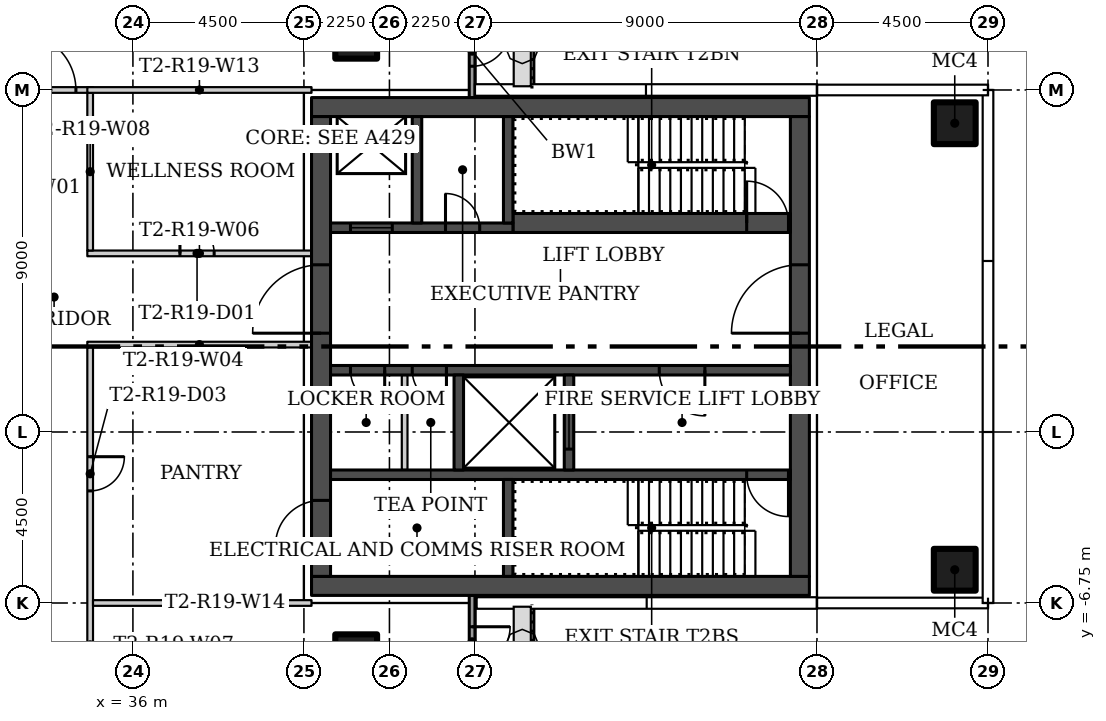
"""IFC4 building model, lengths in metres.
Left out: names, types, materials, properties, quantities, classifications, styles, units other than length and angle.
Written with IfcOpenShell. Run it as: python <this file> out.ifc"""

import sys

from ifc_helpers import new_model, si_unit, direction, frame, frame_2d, origin, origin_2d, place, context, subcontext, project, spatial, rectangle, hollow_rectangle, extrude, element, fill, save


model = new_model("IFC4")
c1 = context("Model", 3, precision=1e-05, world=origin(), true_north=direction((0.0, 1.0)))
c2 = subcontext(c1, "Body", "Model", "MODEL_VIEW")
j1 = project(units=[si_unit("LENGTHUNIT", "METRE"), si_unit("PLANEANGLEUNIT", "RADIAN")], contexts=[c1])
p1 = place(None, origin())
s1 = spatial("IfcSite", under=j1, at=p1, CompositionType="ELEMENT")
p2 = place(p1, origin())
s2 = spatial("IfcBuilding", under=s1, at=p2, CompositionType="ELEMENT")
p3 = place(p2, frame((0.0, 0.0, 170.1)))
s3 = spatial("IfcBuildingStorey", under=s2, at=p3, CompositionType="ELEMENT", Elevation=170.1)
for number, where in (
    (1, (41.875, 8.125, 0.0)),
    (2, (41.875, -8.125, 0.0)),
    (3, (57.625, -5.875, 0.0)),
    (4, (57.625, 5.875, 0.0)),
):
    element("IfcColumn", number, at=place(p3, frame(where)), inside=s3, PredefinedType="COLUMN", context=c2, shape_type="SweptSolid", body=[
        extrude(hollow_rectangle(XDim=1.1, YDim=1.1, WallThickness=0.04, at=origin_2d()), origin(), (0.0, 0.0, 1.0), 3.55),
    ])
p4 = place(p3, frame((40.7, 0.05, 0.0), z_axis=(0.0, 0.0, 1.0), x_axis=(-1.0, 0.0, 0.0)))
e5 = element("IfcWall", 5, at=p4, inside=s3, PredefinedType="PARTITIONING", context=c2, shape_type="SweptSolid", body=[
    extrude(rectangle(XDim=5.9, YDim=0.15, at=frame_2d((2.95, 0.0))), origin(), (0.0, 0.0, 1.0), 3.55),
])
p5 = place(p3, frame((34.8, 2.45, 0.0)))
e6 = element("IfcWall", 6, at=p5, inside=s3, PredefinedType="PARTITIONING", context=c2, shape_type="SweptSolid", body=[
    extrude(rectangle(XDim=5.9, YDim=0.15, at=frame_2d((2.95, 0.0))), origin(), (0.0, 0.0, 1.0), 3.55),
])
p6 = place(p5, frame((2.438, 0.0, 0.0)))
e7 = element("IfcOpeningElement", 7, at=p6, cuts=e6, PredefinedType="OPENING", context=c2, shape_type="SweptSolid", body=[
    extrude(rectangle(XDim=0.9, YDim=2.1, at=frame_2d((0.45, 1.05))), frame((0.0, 0.085, 0.0), z_axis=(0.0, -1.0, 0.0), x_axis=(1.0, 0.0, 0.0)), (0.0, 0.0, 1.0), 0.17),
])
p7 = place(p3, frame((34.875, -0.025, 0.0), z_axis=(0.0, 0.0, 1.0), x_axis=(0.0, -1.0, 0.0)))
e8 = element("IfcWall", 8, at=p7, inside=s3, PredefinedType="PARTITIONING", context=c2, shape_type="SweptSolid", body=[
    extrude(rectangle(XDim=15.65, YDim=0.15, at=frame_2d((7.825, 0.0))), origin(), (0.0, 0.0, 1.0), 3.55),
])
p8 = place(p7, frame((10.725, 0.0, 0.0)))
e9 = element("IfcOpeningElement", 9, at=p8, cuts=e8, PredefinedType="OPENING", context=c2, shape_type="SweptSolid", body=[
    extrude(rectangle(XDim=1.0, YDim=2.4, at=frame_2d((0.5, 1.2))), frame((0.0, 0.085, 0.0), z_axis=(0.0, -1.0, 0.0), x_axis=(1.0, 0.0, 0.0)), (0.0, 0.0, 1.0), 0.17),
])
p9 = place(p7, frame((2.875, 0.0, 0.0)))
e10 = element("IfcOpeningElement", 10, at=p9, cuts=e8, PredefinedType="OPENING", context=c2, shape_type="SweptSolid", body=[
    extrude(rectangle(XDim=0.9, YDim=2.1, at=frame_2d((0.45, 1.05))), frame((0.0, 0.085, 0.0), z_axis=(0.0, -1.0, 0.0), x_axis=(1.0, 0.0, 0.0)), (0.0, 0.0, 1.0), 0.17),
])
p10 = place(p3, frame((34.875, 6.675, 0.0), z_axis=(0.0, 0.0, 1.0), x_axis=(0.0, -1.0, 0.0)))
e11 = element("IfcWall", 11, at=p10, inside=s3, PredefinedType="PARTITIONING", context=c2, shape_type="SweptSolid", body=[
    extrude(rectangle(XDim=4.15, YDim=0.15, at=frame_2d((2.075, 0.0))), origin(), (0.0, 0.0, 1.0), 3.55),
])
p11 = place(p3, frame((32.575, 6.75, 0.0)))
e12 = element("IfcWall", 12, at=p11, inside=s3, PredefinedType="PARTITIONING", context=c2, shape_type="SweptSolid", body=[
    extrude(rectangle(XDim=2.375, YDim=0.15, at=frame_2d((1.188, 0.0))), origin(), (0.0, 0.0, 1.0), 3.55),
])
p12 = place(p11, frame((0.425, 0.0, 0.0)))
e13 = element("IfcOpeningElement", 13, at=p12, cuts=e12, PredefinedType="OPENING", context=c2, shape_type="SweptSolid", body=[
    extrude(rectangle(XDim=1.5, YDim=2.1, at=frame_2d((0.75, 1.05))), frame((0.0, 0.085, 0.0), z_axis=(0.0, -1.0, 0.0), x_axis=(1.0, 0.0, 0.0)), (0.0, 0.0, 1.0), 0.17),
])
p13 = place(p3, frame((40.7, 6.75, 0.0), z_axis=(0.0, 0.0, 1.0), x_axis=(-1.0, 0.0, 0.0)))
e14 = element("IfcWall", 14, at=p13, inside=s3, PredefinedType="PARTITIONING", context=c2, shape_type="SweptSolid", body=[
    extrude(rectangle(XDim=5.9, YDim=0.15, at=frame_2d((2.95, 0.0))), origin(), (0.0, 0.0, 1.0), 3.55),
])
p14 = place(p3, frame((34.95, -6.75, 0.0)))
e15 = element("IfcWall", 15, at=p14, inside=s3, PredefinedType="PARTITIONING", context=c2, shape_type="SweptSolid", body=[
    extrude(rectangle(XDim=5.75, YDim=0.15, at=frame_2d((2.875, 0.0))), origin(), (0.0, 0.0, 1.0), 3.55),
])
p15 = place(p3, frame((44.925, 9.0, 0.0), z_axis=(0.0, 0.0, 1.0), x_axis=(0.0, -1.0, 0.0)))
e16 = element("IfcWall", 16, at=p15, inside=s3, PredefinedType="SOLIDWALL", context=c2, shape_type="SweptSolid", body=[
    extrude(rectangle(XDim=2.457, YDim=0.15, at=frame_2d((1.229, 0.0))), origin(), (0.0, 0.0, 1.0), 3.45),
])
p16 = place(p15, frame((0.625, 0.0, 0.0)))
e17 = element("IfcOpeningElement", 17, at=p16, cuts=e16, PredefinedType="OPENING", context=c2, shape_type="SweptSolid", body=[
    extrude(rectangle(XDim=1.0, YDim=2.4, at=frame_2d((0.5, 1.2))), frame((0.0, 0.085, 0.0), z_axis=(0.0, -1.0, 0.0), x_axis=(1.0, 0.0, 0.0)), (0.0, 0.0, 1.0), 0.17),
])
p17 = place(p3, frame((44.925, -6.543, 0.0), z_axis=(0.0, 0.0, 1.0), x_axis=(0.0, -1.0, 0.0)))
e18 = element("IfcWall", 18, at=p17, inside=s3, PredefinedType="SOLIDWALL", context=c2, shape_type="SweptSolid", body=[
    extrude(rectangle(XDim=2.457, YDim=0.15, at=frame_2d((1.229, 0.0))), origin(), (0.0, 0.0, 1.0), 3.45),
])
p18 = place(p17, frame((0.832, 0.0, 0.0)))
e19 = element("IfcOpeningElement", 19, at=p18, cuts=e18, PredefinedType="OPENING", context=c2, shape_type="SweptSolid", body=[
    extrude(rectangle(XDim=1.0, YDim=2.4, at=frame_2d((0.5, 1.2))), frame((0.0, 0.085, 0.0), z_axis=(0.0, -1.0, 0.0), x_axis=(1.0, 0.0, 0.0)), (0.0, 0.0, 1.0), 0.17),
])
for number, where, z_axis, x_axis in (
    (20, (53.8, -6.3, 0.0), (0.0, 0.0, 1.0), (-1.0, 0.0, 0.0)),
    (21, (53.8, 6.3, 0.0), (0.0, 0.0, 1.0), (-1.0, 0.0, 0.0)),
):
    element("IfcWall", number, at=place(p3, frame(where, z_axis=z_axis, x_axis=x_axis)), inside=s3, PredefinedType="SHEAR", context=c2, shape_type="SweptSolid", body=[
        extrude(rectangle(XDim=13.1, YDim=0.5, at=frame_2d((6.55, 0.0))), origin(), (0.0, 0.0, 1.0), 3.55),
    ])
p19 = place(p3, frame((53.55, -6.05, 0.0), z_axis=(0.0, 0.0, 1.0), x_axis=(0.0, 1.0, 0.0)))
e22 = element("IfcWall", 22, at=p19, inside=s3, PredefinedType="SHEAR", context=c2, shape_type="SweptSolid", body=[
    extrude(rectangle(XDim=12.1, YDim=0.5, at=frame_2d((6.05, 0.0))), origin(), (0.0, 0.0, 1.0), 3.55),
])
p20 = place(p19, frame((6.4, 0.0, 0.0)))
e23 = element("IfcOpeningElement", 23, at=p20, cuts=e22, PredefinedType="OPENING", context=c2, shape_type="SweptSolid", body=[
    extrude(rectangle(XDim=1.8, YDim=2.4, at=frame_2d((0.9, 1.2))), frame((0.0, 0.26, 0.0), z_axis=(0.0, -1.0, 0.0), x_axis=(1.0, 0.0, 0.0)), (0.0, 0.0, 1.0), 0.52),
])
p21 = place(p3, frame((40.95, -6.05, 0.0), z_axis=(0.0, 0.0, 1.0), x_axis=(0.0, 1.0, 0.0)))
e24 = element("IfcWall", 24, at=p21, inside=s3, PredefinedType="SHEAR", context=c2, shape_type="SweptSolid", body=[
    extrude(rectangle(XDim=12.1, YDim=0.5, at=frame_2d((6.05, 0.0))), origin(), (0.0, 0.0, 1.0), 3.55),
])
p22 = place(p21, frame((0.8, 0.0, 0.0)))
e25 = element("IfcOpeningElement", 25, at=p22, cuts=e24, PredefinedType="OPENING", context=c2, shape_type="SweptSolid", body=[
    extrude(rectangle(XDim=1.2, YDim=2.1, at=frame_2d((0.6, 1.05))), frame((0.0, 0.26, 0.0), z_axis=(0.0, -1.0, 0.0), x_axis=(1.0, 0.0, 0.0)), (0.0, 0.0, 1.0), 0.52),
])
p23 = place(p21, frame((6.4, 0.0, 0.0)))
e26 = element("IfcOpeningElement", 26, at=p23, cuts=e24, PredefinedType="OPENING", context=c2, shape_type="SweptSolid", body=[
    extrude(rectangle(XDim=1.8, YDim=2.4, at=frame_2d((0.9, 1.2))), frame((0.0, 0.26, 0.0), z_axis=(0.0, -1.0, 0.0), x_axis=(1.0, 0.0, 0.0)), (0.0, 0.0, 1.0), 0.52),
])
p24 = place(p3, frame((53.3, -3.375, 0.0), z_axis=(0.0, 0.0, 1.0), x_axis=(-1.0, 0.0, 0.0)))
e27 = element("IfcWall", 27, at=p24, inside=s3, PredefinedType="SHEAR", context=c2, shape_type="SweptSolid", body=[
    extrude(rectangle(XDim=12.1, YDim=0.25, at=frame_2d((6.05, 0.0))), origin(), (0.0, 0.0, 1.0), 3.55),
])
p25 = place(p24, frame((0.05, 0.0, 0.0)))
e28 = element("IfcOpeningElement", 28, at=p25, cuts=e27, PredefinedType="OPENING", context=c2, shape_type="SweptSolid", body=[
    extrude(rectangle(XDim=1.1, YDim=2.1, at=frame_2d((0.55, 1.05))), frame((0.0, 0.135, 0.0), z_axis=(0.0, -1.0, 0.0), x_axis=(1.0, 0.0, 0.0)), (0.0, 0.0, 1.0), 0.27),
])
p26 = place(p3, frame((45.875, -6.05, 0.0), z_axis=(0.0, 0.0, 1.0), x_axis=(0.0, 1.0, 0.0)))
e29 = element("IfcWall", 29, at=p26, inside=s3, PredefinedType="SHEAR", context=c2, shape_type="SweptSolid", body=[
    extrude(rectangle(XDim=2.55, YDim=0.25, at=frame_2d((1.275, 0.0))), origin(), (0.0, 0.0, 1.0), 3.55),
])
p27 = place(p3, frame((53.3, -0.625, 0.0), z_axis=(0.0, 0.0, 1.0), x_axis=(-1.0, 0.0, 0.0)))
e30 = element("IfcWall", 30, at=p27, inside=s3, PredefinedType="SHEAR", context=c2, shape_type="SweptSolid", body=[
    extrude(rectangle(XDim=12.1, YDim=0.25, at=frame_2d((6.05, 0.0))), origin(), (0.0, 0.0, 1.0), 3.55),
])
p28 = place(p27, frame((2.25, 0.0, 0.0)))
e31 = element("IfcOpeningElement", 31, at=p28, cuts=e30, PredefinedType="OPENING", context=c2, shape_type="SweptSolid", body=[
    extrude(rectangle(XDim=1.2, YDim=2.1, at=frame_2d((0.6, 1.05))), frame((0.0, 0.135, 0.0), z_axis=(0.0, -1.0, 0.0), x_axis=(1.0, 0.0, 0.0)), (0.0, 0.0, 1.0), 0.27),
])
p29 = place(p27, frame((9.05, 0.0, 0.0)))
e32 = element("IfcOpeningElement", 32, at=p29, cuts=e30, PredefinedType="OPENING", context=c2, shape_type="SweptSolid", body=[
    extrude(rectangle(XDim=0.9, YDim=2.1, at=frame_2d((0.45, 1.05))), frame((0.0, 0.135, 0.0), z_axis=(0.0, -1.0, 0.0), x_axis=(1.0, 0.0, 0.0)), (0.0, 0.0, 1.0), 0.27),
])
p30 = place(p27, frame((10.675, 0.0, 0.0)))
e33 = element("IfcOpeningElement", 33, at=p30, cuts=e30, PredefinedType="OPENING", context=c2, shape_type="SweptSolid", body=[
    extrude(rectangle(XDim=0.9, YDim=2.1, at=frame_2d((0.45, 1.05))), frame((0.0, 0.135, 0.0), z_axis=(0.0, -1.0, 0.0), x_axis=(1.0, 0.0, 0.0)), (0.0, 0.0, 1.0), 0.27),
])
p31 = place(p3, frame((47.475, -3.25, 0.0), z_axis=(0.0, 0.0, 1.0), x_axis=(0.0, 1.0, 0.0)))
e34 = element("IfcWall", 34, at=p31, inside=s3, PredefinedType="SHEAR", context=c2, shape_type="SweptSolid", body=[
    extrude(rectangle(XDim=2.5, YDim=0.25, at=frame_2d((1.25, 0.0))), origin(), (0.0, 0.0, 1.0), 3.55),
])
p32 = place(p31, frame((0.55, 0.0, 0.0)))
e35 = element("IfcOpeningElement", 35, at=p32, cuts=e34, PredefinedType="OPENING", context=c2, shape_type="SweptSolid", body=[
    extrude(rectangle(XDim=1.4, YDim=2.4, at=frame_2d((0.7, 1.2))), frame((0.0, 0.135, 0.0), z_axis=(0.0, -1.0, 0.0), x_axis=(1.0, 0.0, 0.0)), (0.0, 0.0, 1.0), 0.27),
])
p33 = place(p3, frame((44.575, -3.25, 0.0), z_axis=(0.0, 0.0, 1.0), x_axis=(0.0, 1.0, 0.0)))
e36 = element("IfcWall", 36, at=p33, inside=s3, PredefinedType="SHEAR", context=c2, shape_type="SweptSolid", body=[
    extrude(rectangle(XDim=2.5, YDim=0.25, at=frame_2d((1.25, 0.0))), origin(), (0.0, 0.0, 1.0), 3.55),
])
p34 = place(p3, frame((43.15, -3.25, 0.0), z_axis=(0.0, 0.0, 1.0), x_axis=(0.0, 1.0, 0.0)))
e37 = element("IfcWall", 37, at=p34, inside=s3, PredefinedType="PARTITIONING", context=c2, shape_type="SweptSolid", body=[
    extrude(rectangle(XDim=2.5, YDim=0.15, at=frame_2d((1.25, 0.0))), origin(), (0.0, 0.0, 1.0), 3.55),
])
p35 = place(p3, frame((46.0, 3.25, 0.0)))
e38 = element("IfcWall", 38, at=p35, inside=s3, PredefinedType="SHEAR", context=c2, shape_type="SweptSolid", body=[
    extrude(rectangle(XDim=7.3, YDim=0.5, at=frame_2d((3.65, 0.0))), origin(), (0.0, 0.0, 1.0), 3.55),
])
p36 = place(p35, frame((6.15, 0.0, 0.0)))
e39 = element("IfcOpeningElement", 39, at=p36, cuts=e38, PredefinedType="OPENING", context=c2, shape_type="SweptSolid", body=[
    extrude(rectangle(XDim=1.1, YDim=2.1, at=frame_2d((0.55, 1.05))), frame((0.0, 0.26, 0.0), z_axis=(0.0, -1.0, 0.0), x_axis=(1.0, 0.0, 0.0)), (0.0, 0.0, 1.0), 0.52),
])
p37 = place(p3, frame((41.2, 3.125, 0.0)))
e40 = element("IfcWall", 40, at=p37, inside=s3, PredefinedType="SHEAR", context=c2, shape_type="SweptSolid", body=[
    extrude(rectangle(XDim=4.8, YDim=0.25, at=frame_2d((2.4, 0.0))), origin(), (0.0, 0.0, 1.0), 3.55),
])
p38 = place(p37, frame((0.525, 0.0, 0.0)))
e41 = element("IfcOpeningElement", 41, at=p38, cuts=e40, PredefinedType="OPENING", context=c2, shape_type="SweptSolid", body=[
    extrude(rectangle(XDim=1.1, YDim=2.1, at=frame_2d((0.55, 1.05))), frame((0.0, 0.135, 0.0), z_axis=(0.0, -1.0, 0.0), x_axis=(1.0, 0.0, 0.0)), (0.0, 0.0, 1.0), 0.27),
])
p39 = place(p37, frame((3.025, 0.0, 0.0)))
e42 = element("IfcOpeningElement", 42, at=p39, cuts=e40, PredefinedType="OPENING", context=c2, shape_type="SweptSolid", body=[
    extrude(rectangle(XDim=0.9, YDim=2.1, at=frame_2d((0.45, 1.05))), frame((0.0, 0.135, 0.0), z_axis=(0.0, -1.0, 0.0), x_axis=(1.0, 0.0, 0.0)), (0.0, 0.0, 1.0), 0.27),
])
for number, where, z_axis, x_axis in (
    (43, (45.875, 3.25, 0.0), (0.0, 0.0, 1.0), (0.0, 1.0, 0.0)),
    (44, (43.475, 3.25, 0.0), (0.0, 0.0, 1.0), (0.0, 1.0, 0.0)),
):
    element("IfcWall", number, at=place(p3, frame(where, z_axis=z_axis, x_axis=x_axis)), inside=s3, PredefinedType="SHEAR", context=c2, shape_type="SweptSolid", body=[
        extrude(rectangle(XDim=2.8, YDim=0.25, at=frame_2d((1.4, 0.0))), origin(), (0.0, 0.0, 1.0), 3.55),
    ])
p40 = place(p6, origin())
e45 = element("IfcDoor", 45, at=p40, inside=s3, OperationType="SINGLE_SWING_RIGHT", PredefinedType="DOOR", context=c2, shape_type="SweptSolid", body=[
    extrude(rectangle(XDim=0.9, YDim=2.1, at=frame_2d((0.45, 1.05))), frame((0.0, 0.025, 0.0), z_axis=(0.0, -1.0, 0.0), x_axis=(1.0, 0.0, 0.0)), (0.0, 0.0, 1.0), 0.05),
])
fill(e7, e45)
p41 = place(p9, origin())
e46 = element("IfcDoor", 46, at=p41, inside=s3, OperationType="SINGLE_SWING_LEFT", PredefinedType="DOOR", context=c2, shape_type="SweptSolid", body=[
    extrude(rectangle(XDim=0.9, YDim=2.1, at=frame_2d((0.45, 1.05))), frame((0.0, 0.025, 0.0), z_axis=(0.0, -1.0, 0.0), x_axis=(1.0, 0.0, 0.0)), (0.0, 0.0, 1.0), 0.05),
])
fill(e10, e46)
p42 = place(p12, origin())
e47 = element("IfcDoor", 47, at=p42, inside=s3, OperationType="DOUBLE_DOOR_SINGLE_SWING", PredefinedType="DOOR", context=c2, shape_type="SweptSolid", body=[
    extrude(rectangle(XDim=1.5, YDim=2.1, at=frame_2d((0.75, 1.05))), frame((0.0, 0.025, 0.0), z_axis=(0.0, -1.0, 0.0), x_axis=(1.0, 0.0, 0.0)), (0.0, 0.0, 1.0), 0.05),
])
fill(e13, e47)
p43 = place(p16, origin())
e48 = element("IfcDoor", 48, at=p43, inside=s3, OperationType="SINGLE_SWING_LEFT", PredefinedType="DOOR", context=c2, shape_type="SweptSolid", body=[
    extrude(rectangle(XDim=1.0, YDim=2.4, at=frame_2d((0.5, 1.2))), frame((0.0, 0.025, 0.0), z_axis=(0.0, -1.0, 0.0), x_axis=(1.0, 0.0, 0.0)), (0.0, 0.0, 1.0), 0.05),
])
fill(e17, e48)
p44 = place(p18, origin())
e49 = element("IfcDoor", 49, at=p44, inside=s3, OperationType="SINGLE_SWING_RIGHT", PredefinedType="DOOR", context=c2, shape_type="SweptSolid", body=[
    extrude(rectangle(XDim=1.0, YDim=2.4, at=frame_2d((0.5, 1.2))), frame((0.0, 0.025, 0.0), z_axis=(0.0, -1.0, 0.0), x_axis=(1.0, 0.0, 0.0)), (0.0, 0.0, 1.0), 0.05),
])
fill(e19, e49)
p45 = place(p20, origin())
e50 = element("IfcDoor", 50, at=p45, inside=s3, OperationType="DOUBLE_DOOR_SINGLE_SWING", PredefinedType="DOOR", context=c2, shape_type="SweptSolid", body=[
    extrude(rectangle(XDim=1.8, YDim=2.4, at=frame_2d((0.9, 1.2))), frame((0.0, 0.025, 0.0), z_axis=(0.0, -1.0, 0.0), x_axis=(1.0, 0.0, 0.0)), (0.0, 0.0, 1.0), 0.05),
])
fill(e23, e50)
p46 = place(p22, origin())
e51 = element("IfcDoor", 51, at=p46, inside=s3, OperationType="SINGLE_SWING_LEFT", PredefinedType="DOOR", context=c2, shape_type="SweptSolid", body=[
    extrude(rectangle(XDim=1.2, YDim=2.1, at=frame_2d((0.6, 1.05))), frame((0.0, 0.025, 0.0), z_axis=(0.0, -1.0, 0.0), x_axis=(1.0, 0.0, 0.0)), (0.0, 0.0, 1.0), 0.05),
])
fill(e25, e51)
p47 = place(p23, origin())
e52 = element("IfcDoor", 52, at=p47, inside=s3, OperationType="DOUBLE_DOOR_SINGLE_SWING", PredefinedType="DOOR", context=c2, shape_type="SweptSolid", body=[
    extrude(rectangle(XDim=1.8, YDim=2.4, at=frame_2d((0.9, 1.2))), frame((0.0, 0.025, 0.0), z_axis=(0.0, -1.0, 0.0), x_axis=(1.0, 0.0, 0.0)), (0.0, 0.0, 1.0), 0.05),
])
fill(e26, e52)
p48 = place(p25, origin())
e53 = element("IfcDoor", 53, at=p48, inside=s3, OperationType="SINGLE_SWING_LEFT", PredefinedType="DOOR", context=c2, shape_type="SweptSolid", body=[
    extrude(rectangle(XDim=1.1, YDim=2.1, at=frame_2d((0.55, 1.05))), frame((0.0, 0.025, 0.0), z_axis=(0.0, -1.0, 0.0), x_axis=(1.0, 0.0, 0.0)), (0.0, 0.0, 1.0), 0.05),
])
fill(e28, e53)
p49 = place(p28, origin())
e54 = element("IfcDoor", 54, at=p49, inside=s3, OperationType="SINGLE_SWING_LEFT", PredefinedType="DOOR", context=c2, shape_type="SweptSolid", body=[
    extrude(rectangle(XDim=1.2, YDim=2.1, at=frame_2d((0.6, 1.05))), frame((0.0, 0.025, 0.0), z_axis=(0.0, -1.0, 0.0), x_axis=(1.0, 0.0, 0.0)), (0.0, 0.0, 1.0), 0.05),
])
fill(e31, e54)
p50 = place(p29, origin())
e55 = element("IfcDoor", 55, at=p50, inside=s3, OperationType="SINGLE_SWING_RIGHT", PredefinedType="DOOR", context=c2, shape_type="SweptSolid", body=[
    extrude(rectangle(XDim=0.9, YDim=2.1, at=frame_2d((0.45, 1.05))), frame((0.0, 0.025, 0.0), z_axis=(0.0, -1.0, 0.0), x_axis=(1.0, 0.0, 0.0)), (0.0, 0.0, 1.0), 0.05),
])
fill(e32, e55)
p51 = place(p30, origin())
e56 = element("IfcDoor", 56, at=p51, inside=s3, OperationType="SINGLE_SWING_RIGHT", PredefinedType="DOOR", context=c2, shape_type="SweptSolid", body=[
    extrude(rectangle(XDim=0.9, YDim=2.1, at=frame_2d((0.45, 1.05))), frame((0.0, 0.025, 0.0), z_axis=(0.0, -1.0, 0.0), x_axis=(1.0, 0.0, 0.0)), (0.0, 0.0, 1.0), 0.05),
])
fill(e33, e56)
p52 = place(p32, origin())
e57 = element("IfcDoor", 57, at=p52, inside=s3, OperationType="SLIDING_TO_LEFT", PredefinedType="DOOR", context=c2, shape_type="SweptSolid", body=[
    extrude(rectangle(XDim=1.4, YDim=2.4, at=frame_2d((0.7, 1.2))), frame((0.0, 0.025, 0.0), z_axis=(0.0, -1.0, 0.0), x_axis=(1.0, 0.0, 0.0)), (0.0, 0.0, 1.0), 0.05),
])
fill(e35, e57)
p53 = place(p36, origin())
e58 = element("IfcDoor", 58, at=p53, inside=s3, OperationType="SINGLE_SWING_RIGHT", PredefinedType="DOOR", context=c2, shape_type="SweptSolid", body=[
    extrude(rectangle(XDim=1.1, YDim=2.1, at=frame_2d((0.55, 1.05))), frame((0.0, 0.025, 0.0), z_axis=(0.0, -1.0, 0.0), x_axis=(1.0, 0.0, 0.0)), (0.0, 0.0, 1.0), 0.05),
])
fill(e39, e58)
p54 = place(p38, origin())
e59 = element("IfcDoor", 59, at=p54, inside=s3, OperationType="SLIDING_TO_LEFT", PredefinedType="DOOR", context=c2, shape_type="SweptSolid", body=[
    extrude(rectangle(XDim=1.1, YDim=2.1, at=frame_2d((0.55, 1.05))), frame((0.0, 0.025, 0.0), z_axis=(0.0, -1.0, 0.0), x_axis=(1.0, 0.0, 0.0)), (0.0, 0.0, 1.0), 0.05),
])
fill(e41, e59)
p55 = place(p39, origin())
e60 = element("IfcDoor", 60, at=p55, inside=s3, OperationType="SINGLE_SWING_RIGHT", PredefinedType="DOOR", context=c2, shape_type="SweptSolid", body=[
    extrude(rectangle(XDim=0.9, YDim=2.1, at=frame_2d((0.45, 1.05))), frame((0.0, 0.025, 0.0), z_axis=(0.0, -1.0, 0.0), x_axis=(1.0, 0.0, 0.0)), (0.0, 0.0, 1.0), 0.05),
])
fill(e42, e60)
save(model, sys.argv[1])
